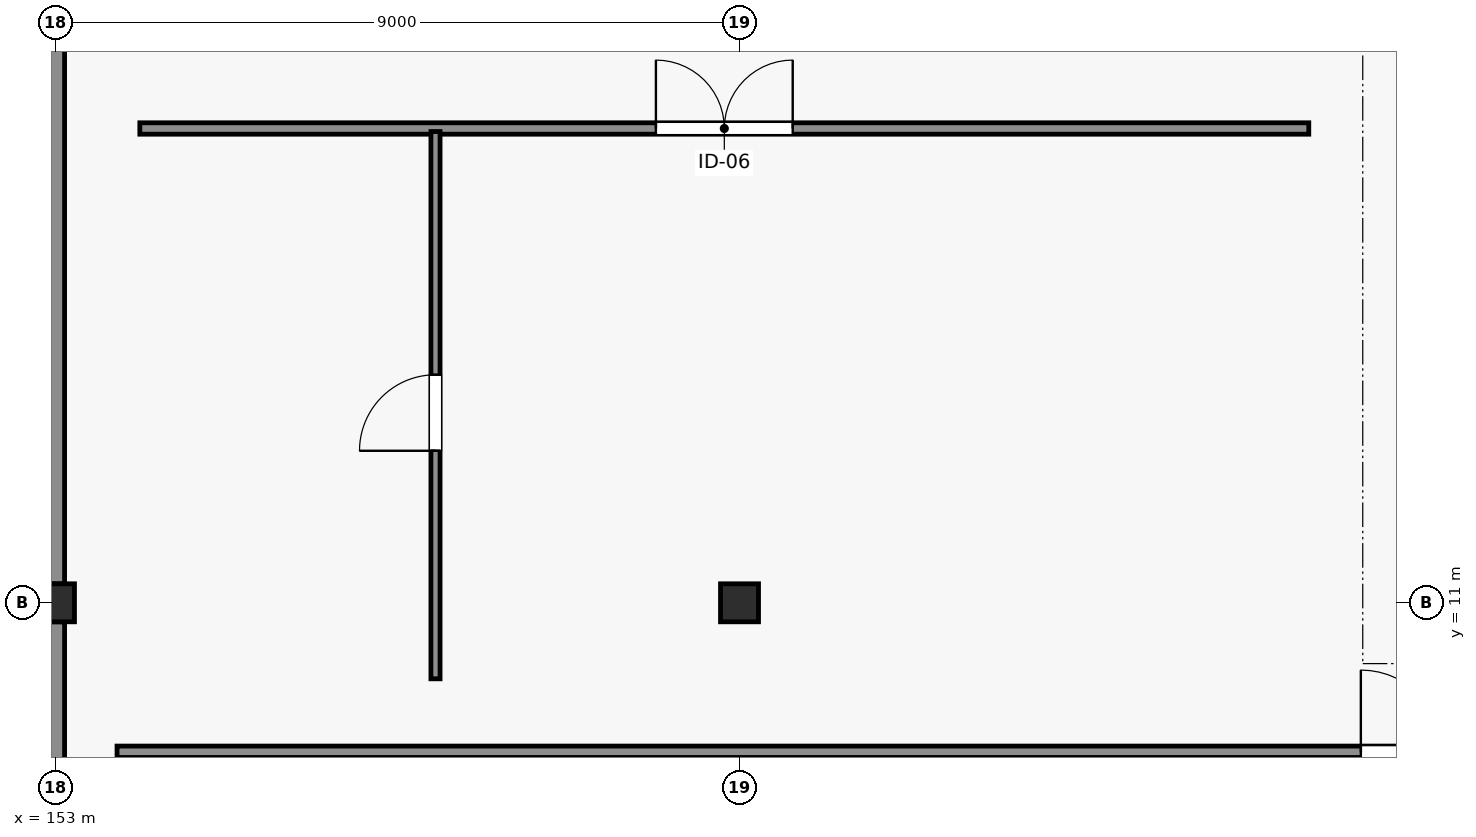
"""IFC4 building model, lengths in metres.
Left out: names, types, materials, properties, quantities, classifications, styles, units other than length and angle.
Written with IfcOpenShell. Run it as: python <this file> out.ifc"""

import sys

from ifc_helpers import new_model, si_unit, direction, frame, frame_2d, origin, origin_2d, place, context, subcontext, project, spatial, rectangle, extrude, element, fill, save


model = new_model("IFC4")
c1 = context("Model", 3, precision=1e-05, world=origin(), true_north=direction((0.0, 1.0)))
c2 = subcontext(c1, "Body", "Model", "MODEL_VIEW")
j1 = project(units=[si_unit("LENGTHUNIT", "METRE"), si_unit("PLANEANGLEUNIT", "RADIAN")], contexts=[c1])
p1 = place(None, origin())
s1 = spatial("IfcSite", under=j1, at=p1, CompositionType="ELEMENT")
p2 = place(p1, origin())
s2 = spatial("IfcBuilding", under=s1, at=p2, CompositionType="ELEMENT")
p3 = place(p2, frame((0.0, 0.0, 9.8)))
s3 = spatial("IfcBuildingStorey", under=s2, at=p3, CompositionType="ELEMENT", Elevation=9.8)
for number, where, z_axis, x_axis in (
    (1, (153.0, 11.0, 0.0), (0.0, 0.0, 1.0), (1.0, 0.0, 0.0)),
    (2, (162.0, 11.0, 0.0), (0.0, 0.0, 1.0), (1.0, 0.0, 0.0)),
):
    element("IfcColumn", number, at=place(p3, frame(where, z_axis=z_axis, x_axis=x_axis)), inside=s3, PredefinedType="COLUMN", context=c2, shape_type="SweptSolid", body=[
        extrude(rectangle(XDim=0.5, YDim=0.5, at=origin_2d()), origin(), (0.0, 0.0, 1.0), 4.87),
    ])
p4 = place(p3, frame((153.0, 0.25, 0.0), z_axis=(0.0, 0.0, 1.0), x_axis=(0.0, 1.0, 0.0)))
e3 = element("IfcWall", 3, at=p4, inside=s3, PredefinedType="SOLIDWALL", context=c2, shape_type="SweptSolid", body=[
    extrude(rectangle(XDim=10.5, YDim=0.24, at=frame_2d((5.25, 0.0))), origin(), (0.0, 0.0, 1.0), 4.39),
])
p5 = place(p3, frame((153.0, 11.25, 0.0), z_axis=(0.0, 0.0, 1.0), x_axis=(0.0, 1.0, 0.0)))
e4 = element("IfcWall", 4, at=p5, inside=s3, PredefinedType="SOLIDWALL", context=c2, shape_type="SweptSolid", body=[
    extrude(rectangle(XDim=11.0, YDim=0.24, at=frame_2d((5.5, 0.0))), origin(), (0.0, 0.0, 1.0), 4.39),
])
p6 = place(p3, frame((154.11, 17.24, 0.0), z_axis=(0.0, 0.0, 1.0), x_axis=(1.0, 0.0, 0.0)))
e5 = element("IfcWall", 5, at=p6, inside=s3, PredefinedType="PARTITIONING", context=c2, shape_type="SweptSolid", body=[
    extrude(rectangle(XDim=15.38, YDim=0.15, at=frame_2d((7.69, 0.0))), origin(), (0.0, 0.0, 1.0), 4.44),
])
p7 = place(p6, frame((6.79, 0.0, 0.0)))
e6 = element("IfcOpeningElement", 6, at=p7, cuts=e5, PredefinedType="OPENING", context=c2, shape_type="SweptSolid", body=[
    extrude(rectangle(XDim=1.8, YDim=2.3, at=frame_2d((0.9, 1.15))), frame((0.0, 0.085, 0.0), z_axis=(0.0, -1.0, 0.0), x_axis=(1.0, 0.0, 0.0)), (0.0, 0.0, 1.0), 0.17),
])
p8 = place(p3, frame((153.81, 9.04, 0.0), z_axis=(0.0, 0.0, 1.0), x_axis=(1.0, 0.0, 0.0)))
e7 = element("IfcWall", 7, at=p8, inside=s3, PredefinedType="PARTITIONING", context=c2, shape_type="SweptSolid", body=[
    extrude(rectangle(XDim=34.88, YDim=0.15, at=frame_2d((17.44, 0.0))), origin(), (0.0, 0.0, 1.0), 4.44),
])
p9 = place(p8, frame((16.365, 0.0, 0.0)))
e8 = element("IfcOpeningElement", 8, at=p9, cuts=e7, PredefinedType="OPENING", context=c2, shape_type="SweptSolid", body=[
    extrude(rectangle(XDim=2.15, YDim=2.4, at=frame_2d((1.075, 1.2))), frame((0.0, 0.085, 0.0), z_axis=(0.0, -1.0, 0.0), x_axis=(1.0, 0.0, 0.0)), (0.0, 0.0, 1.0), 0.17),
])
p10 = place(p3, frame((158.0, 10.0, 0.0), z_axis=(0.0, 0.0, 1.0), x_axis=(0.0, 1.0, 0.0)))
e9 = element("IfcWall", 9, at=p10, inside=s3, PredefinedType="PARTITIONING", context=c2, shape_type="SweptSolid", body=[
    extrude(rectangle(XDim=7.2, YDim=0.12, at=frame_2d((3.6, 0.0))), origin(), (0.0, 0.0, 1.0), 4.44),
])
p11 = place(p10, frame((3.0, 0.0, 0.0)))
e10 = element("IfcOpeningElement", 10, at=p11, cuts=e9, PredefinedType="OPENING", context=c2, shape_type="SweptSolid", body=[
    extrude(rectangle(XDim=1.0, YDim=2.15, at=frame_2d((0.5, 1.075))), frame((0.0, 0.07, 0.0), z_axis=(0.0, -1.0, 0.0), x_axis=(1.0, 0.0, 0.0)), (0.0, 0.0, 1.0), 0.14),
])
p12 = place(p7, origin())
e11 = element("IfcDoor", 11, at=p12, inside=s3, OperationType="DOUBLE_DOOR_SINGLE_SWING", PredefinedType="DOOR", context=c2, shape_type="SweptSolid", body=[
    extrude(rectangle(XDim=1.8, YDim=2.3, at=frame_2d((0.9, 1.15))), frame((0.0, 0.025, 0.0), z_axis=(0.0, -1.0, 0.0), x_axis=(1.0, 0.0, 0.0)), (0.0, 0.0, 1.0), 0.05),
])
fill(e6, e11)
p13 = place(p9, origin())
e12 = element("IfcDoor", 12, at=p13, inside=s3, OperationType="DOUBLE_DOOR_SINGLE_SWING", PredefinedType="DOOR", context=c2, shape_type="SweptSolid", body=[
    extrude(rectangle(XDim=2.15, YDim=2.4, at=frame_2d((1.075, 1.2))), frame((0.0, 0.025, 0.0), z_axis=(0.0, -1.0, 0.0), x_axis=(1.0, 0.0, 0.0)), (0.0, 0.0, 1.0), 0.05),
])
fill(e8, e12)
p14 = place(p11, origin())
e13 = element("IfcDoor", 13, at=p14, inside=s3, OperationType="SINGLE_SWING_LEFT", PredefinedType="DOOR", context=c2, shape_type="SweptSolid", body=[
    extrude(rectangle(XDim=1.0, YDim=2.15, at=frame_2d((0.5, 1.075))), frame((0.0, 0.025, 0.0), z_axis=(0.0, -1.0, 0.0), x_axis=(1.0, 0.0, 0.0)), (0.0, 0.0, 1.0), 0.05),
])
fill(e10, e13)
save(model, sys.argv[1])
